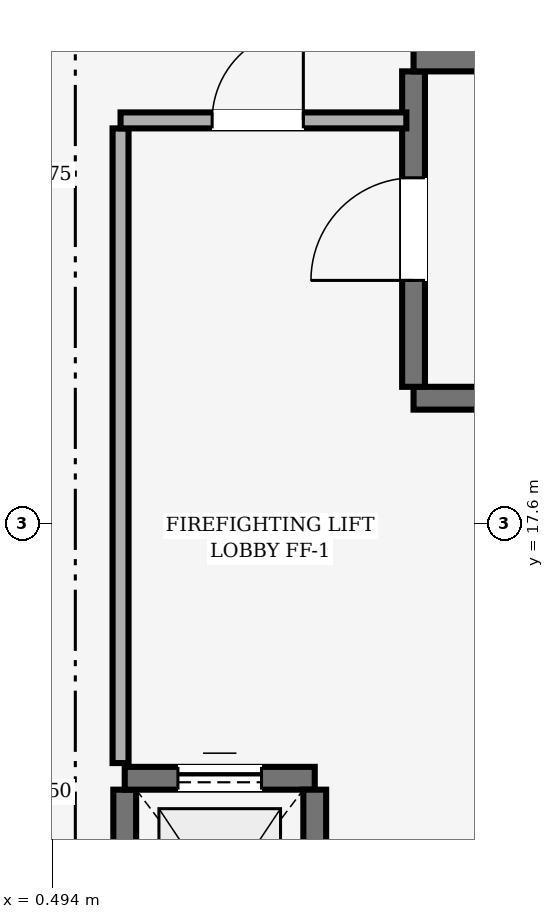
"""IFC4 building model, lengths in metres.
Left out: names, types, materials, properties, quantities, classifications, styles, units other than length and angle.
Written with IfcOpenShell. Run it as: python <this file> out.ifc"""

import sys

from ifc_helpers import new_model, si_unit, direction, frame, frame_2d, origin, place, context, subcontext, project, spatial, rectangle, extrude, element, fill, save


model = new_model("IFC4")
c1 = context("Model", 3, precision=1e-05, world=origin(), true_north=direction((0.0, 1.0)))
c2 = subcontext(c1, "Body", "Model", "MODEL_VIEW")
j1 = project(units=[si_unit("LENGTHUNIT", "METRE"), si_unit("PLANEANGLEUNIT", "RADIAN")], contexts=[c1])
p1 = place(None, origin())
s1 = spatial("IfcSite", under=j1, at=p1, CompositionType="ELEMENT")
p2 = place(p1, origin())
s2 = spatial("IfcBuilding", under=s1, at=p2, CompositionType="ELEMENT")
p3 = place(p2, origin())
s3 = spatial("IfcBuildingStorey", under=s2, at=p3, CompositionType="ELEMENT", Elevation=0.0)
p4 = place(p3, frame((15.43, 19.25, 0.0), z_axis=(0.0, 0.0, 1.0), x_axis=(-1.0, 0.0, 0.0)))
e1 = element("IfcWall", 1, at=p4, inside=s3, PredefinedType="SHEAR", context=c2, shape_type="SweptSolid", body=[
    extrude(rectangle(XDim=10.18, YDim=0.3, at=frame_2d((5.09, 0.0))), origin(), (0.0, 0.0, 1.0), 4.25),
])
p5 = place(p3, frame((5.25, 19.4, 0.0), z_axis=(0.0, 0.0, 1.0), x_axis=(0.0, 1.0, 0.0)))
e2 = element("IfcWall", 2, at=p5, inside=s3, PredefinedType="SHEAR", context=c2, shape_type="SweptSolid", body=[
    extrude(rectangle(XDim=4.15, YDim=0.3, at=frame_2d((2.075, 0.0))), origin(), (0.0, 0.0, 1.0), 4.25),
])
p6 = place(p5, frame((1.4, 0.0, 0.0)))
e3 = element("IfcOpeningElement", 3, at=p6, cuts=e2, PredefinedType="OPENING", context=c2, shape_type="SweptSolid", body=[
    extrude(rectangle(XDim=1.35, YDim=2.2, at=frame_2d((0.675, 1.1))), frame((0.0, 0.15, 0.0), z_axis=(0.0, -1.0, 0.0), x_axis=(1.0, 0.0, 0.0)), (0.0, 0.0, 1.0), 0.3),
])
p7 = place(p3, frame((5.25, 23.7, 0.0), z_axis=(0.0, 0.0, 1.0), x_axis=(1.0, 0.0, 0.0)))
e4 = element("IfcWall", 4, at=p7, inside=s3, PredefinedType="SHEAR", context=c2, shape_type="SweptSolid", body=[
    extrude(rectangle(XDim=10.18, YDim=0.3, at=frame_2d((5.09, 0.0))), origin(), (0.0, 0.0, 1.0), 4.25),
])
p8 = place(p3, frame((1.45, 11.2, 0.0), z_axis=(0.0, 0.0, 1.0), x_axis=(0.0, 1.0, 0.0)))
e5 = element("IfcWall", 5, at=p8, inside=s3, PredefinedType="SHEAR", context=c2, shape_type="SweptSolid", body=[
    extrude(rectangle(XDim=2.9, YDim=0.3, at=frame_2d((1.45, 0.0))), origin(), (0.0, 0.0, 1.0), 4.25),
])
p9 = place(p3, frame((1.45, 14.25, 0.0), z_axis=(0.0, 0.0, 1.0), x_axis=(1.0, 0.0, 0.0)))
e6 = element("IfcWall", 6, at=p9, inside=s3, PredefinedType="SHEAR", context=c2, shape_type="SweptSolid", body=[
    extrude(rectangle(XDim=2.5, YDim=0.3, at=frame_2d((1.25, 0.0))), origin(), (0.0, 0.0, 1.0), 4.25),
])
p10 = place(p9, frame((0.7, 0.0, 0.0)))
e7 = element("IfcOpeningElement", 7, at=p10, cuts=e6, PredefinedType="OPENING", context=c2, shape_type="SweptSolid", body=[
    extrude(rectangle(XDim=1.1, YDim=2.1, at=frame_2d((0.55, 1.05))), frame((0.0, 0.15, 0.0), z_axis=(0.0, -1.0, 0.0), x_axis=(1.0, 0.0, 0.0)), (0.0, 0.0, 1.0), 0.3),
])
p11 = place(p3, frame((3.95, 14.1, 0.0), z_axis=(0.0, 0.0, 1.0), x_axis=(0.0, -1.0, 0.0)))
e8 = element("IfcWall", 8, at=p11, inside=s3, PredefinedType="SHEAR", context=c2, shape_type="SweptSolid", body=[
    extrude(rectangle(XDim=2.9, YDim=0.3, at=frame_2d((1.45, 0.0))), origin(), (0.0, 0.0, 1.0), 4.25),
])
p12 = place(p3, frame((1.395, 14.45, 0.0), z_axis=(0.0, 0.0, 1.0), x_axis=(0.0, 1.0, 0.0)))
e9 = element("IfcWall", 9, at=p12, inside=s3, PredefinedType="PARTITIONING", context=c2, shape_type="SweptSolid", body=[
    extrude(rectangle(XDim=8.35, YDim=0.21, at=frame_2d((4.175, 0.0))), origin(), (0.0, 0.0, 1.0), 4.23),
])
p13 = place(p3, frame((1.395, 22.905, 0.0), z_axis=(0.0, 0.0, 1.0), x_axis=(1.0, 0.0, 0.0)))
e10 = element("IfcWall", 10, at=p13, inside=s3, PredefinedType="PARTITIONING", context=c2, shape_type="SweptSolid", body=[
    extrude(rectangle(XDim=3.76, YDim=0.21, at=frame_2d((1.88, 0.0))), origin(), (0.0, 0.0, 1.0), 4.23),
])
p14 = place(p13, frame((1.205, 0.0, 0.0)))
e11 = element("IfcOpeningElement", 11, at=p14, cuts=e10, PredefinedType="OPENING", context=c2, shape_type="SweptSolid", body=[
    extrude(rectangle(XDim=1.2, YDim=2.15, at=frame_2d((0.6, 1.075))), frame((0.0, 0.105, 0.0), z_axis=(0.0, -1.0, 0.0), x_axis=(1.0, 0.0, 0.0)), (0.0, 0.0, 1.0), 0.21),
])
p15 = place(p6, origin())
e12 = element("IfcDoor", 12, at=p15, inside=s3, OperationType="SINGLE_SWING_LEFT", PredefinedType="DOOR", context=c2, shape_type="SweptSolid", body=[
    extrude(rectangle(XDim=1.35, YDim=2.2, at=frame_2d((0.675, 1.1))), frame((0.0, 0.025, 0.0), z_axis=(0.0, -1.0, 0.0), x_axis=(1.0, 0.0, 0.0)), (0.0, 0.0, 1.0), 0.05),
])
fill(e3, e12)
p16 = place(p10, origin())
e13 = element("IfcDoor", 13, at=p16, inside=s3, OperationType="SLIDING_TO_LEFT", PredefinedType="DOOR", context=c2, shape_type="SweptSolid", body=[
    extrude(rectangle(XDim=1.1, YDim=2.1, at=frame_2d((0.55, 1.05))), frame((0.0, 0.025, 0.0), z_axis=(0.0, -1.0, 0.0), x_axis=(1.0, 0.0, 0.0)), (0.0, 0.0, 1.0), 0.05),
])
fill(e7, e13)
p17 = place(p14, origin())
e14 = element("IfcDoor", 14, at=p17, inside=s3, OperationType="SINGLE_SWING_RIGHT", PredefinedType="DOOR", context=c2, shape_type="SweptSolid", body=[
    extrude(rectangle(XDim=1.2, YDim=2.15, at=frame_2d((0.6, 1.075))), frame((0.0, 0.025, 0.0), z_axis=(0.0, -1.0, 0.0), x_axis=(1.0, 0.0, 0.0)), (0.0, 0.0, 1.0), 0.05),
])
fill(e11, e14)
save(model, sys.argv[1])
